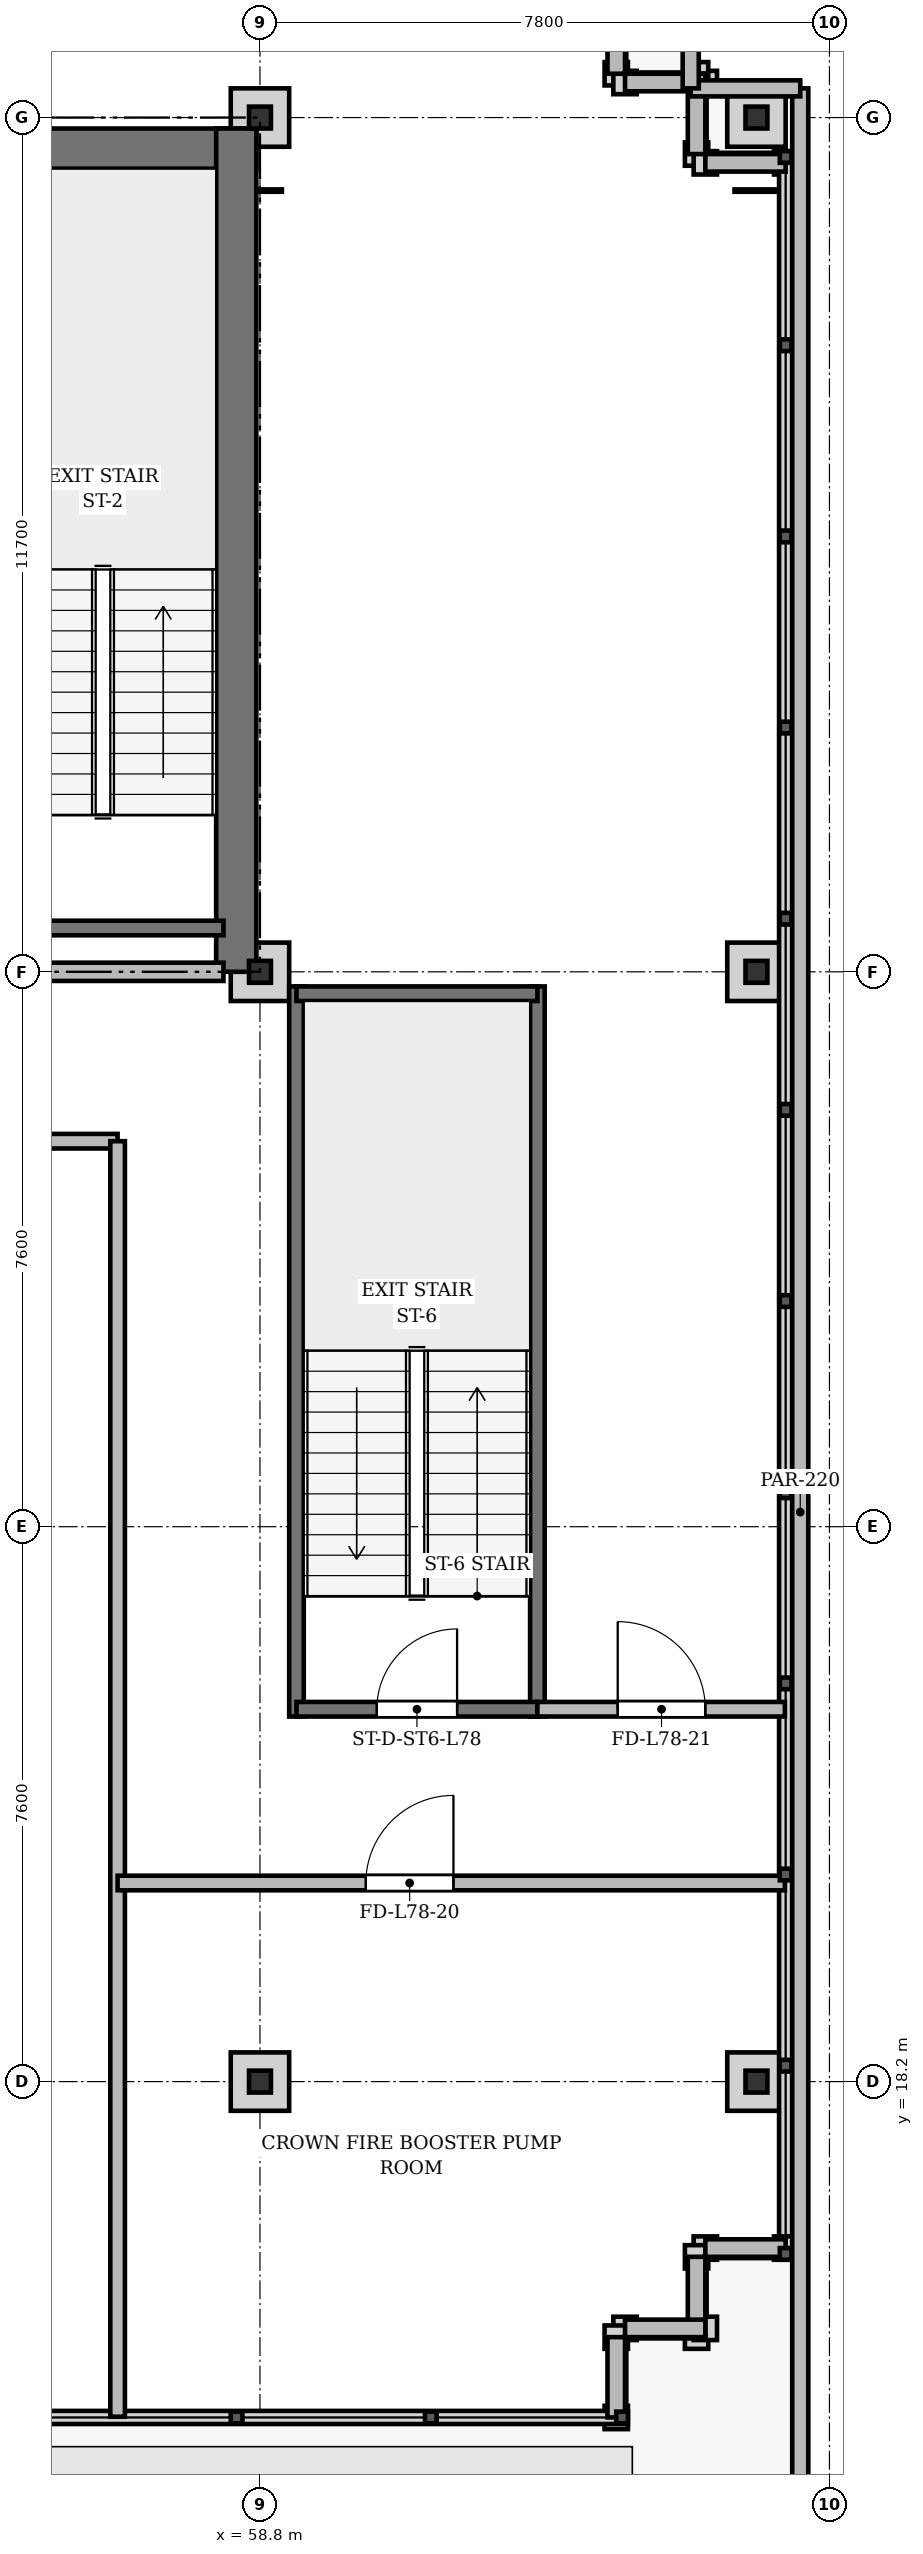
"""IFC4 building model, lengths in metres.
Left out: names, types, materials, properties, quantities, classifications, styles, units other than length and angle.
Written with IfcOpenShell. Run it as: python <this file> out.ifc"""

import sys

from ifc_helpers import new_model, si_unit, direction, frame, frame_2d, origin, origin_2d, place, context, subcontext, project, spatial, rectangle, i_section, extrude, source, transform, mapped, element, fill, save


model = new_model("IFC4")
c1 = context("Model", 3, precision=1e-05, world=origin(), true_north=direction((0.0, 1.0)))
c2 = subcontext(c1, "Body", "Model", "MODEL_VIEW")
j1 = project(units=[si_unit("LENGTHUNIT", "METRE"), si_unit("PLANEANGLEUNIT", "RADIAN")], contexts=[c1])
p1 = place(None, origin())
s1 = spatial("IfcSite", under=j1, at=p1, CompositionType="ELEMENT")
p2 = place(p1, origin())
s2 = spatial("IfcBuilding", under=s1, at=p2, CompositionType="ELEMENT")
p3 = place(p2, frame((0.0, 0.0, 299.1)))
s3 = spatial("IfcBuildingStorey", under=s2, at=p3, CompositionType="ELEMENT", Elevation=299.1)
m1 = source(origin(), c2, "Body", "SweptSolid", [
    extrude(i_section(OverallWidth=0.3, OverallDepth=0.3, WebThickness=0.015, FlangeThickness=0.024, at=origin_2d()), origin(), (0.0, 0.0, 1.0), 4.4),
])
for number, where, z_axis, x_axis in (
    (1, (58.8, 18.2, 0.0), (0.0, 0.0, 1.0), (1.0, 0.0, 0.0)),
    (2, (58.8, 33.4, 0.0), (0.0, 0.0, 1.0), (1.0, 0.0, 0.0)),
    (3, (58.8, 45.1, 0.0), (0.0, 0.0, 1.0), (1.0, 0.0, 0.0)),
    (4, (65.6, 18.2, 0.0), (0.0, 0.0, 1.0), (1.0, 0.0, 0.0)),
    (5, (65.6, 33.4, 0.0), (0.0, 0.0, 1.0), (1.0, 0.0, 0.0)),
    (6, (65.6, 45.1, 0.0), (0.0, 0.0, 1.0), (1.0, 0.0, 0.0)),
):
    element("IfcColumn", number, at=place(p3, frame(where, z_axis=z_axis, x_axis=x_axis)), inside=s3, PredefinedType="COLUMN", context=c2, shape_type="MappedRepresentation", body=[
        mapped(m1, transform((0.0, 0.0, 0.0), x_axis=(1.0, 0.0, 0.0), y_axis=(0.0, 1.0, 0.0), z_axis=(0.0, 0.0, 1.0), scale=1.0)),
    ])
p4 = place(p3, frame((63.68, 46.8, 0.0), z_axis=(0.0, 0.0, 1.0), x_axis=(0.0, -1.0, 0.0)))
e7 = element("IfcWall", 7, at=p4, inside=s3, PredefinedType="SOLIDWALL", context=c2, shape_type="SweptSolid", body=[
    extrude(rectangle(XDim=1.1, YDim=0.24, at=frame_2d((0.55, 0.0))), origin(), (0.0, 0.0, 1.0), 4.12),
])
p5 = place(p3, frame((63.8, 45.58, 0.0), z_axis=(0.0, 0.0, 1.0), x_axis=(1.0, 0.0, 0.0)))
e8 = element("IfcWall", 8, at=p5, inside=s3, PredefinedType="SOLIDWALL", context=c2, shape_type="SweptSolid", body=[
    extrude(rectangle(XDim=1.1, YDim=0.24, at=frame_2d((0.55, 0.0))), origin(), (0.0, 0.0, 1.0), 4.12),
])
p6 = place(p3, frame((64.78, 45.7, 0.0), z_axis=(0.0, 0.0, 1.0), x_axis=(0.0, -1.0, 0.0)))
e9 = element("IfcWall", 9, at=p6, inside=s3, PredefinedType="SOLIDWALL", context=c2, shape_type="SweptSolid", body=[
    extrude(rectangle(XDim=1.1, YDim=0.24, at=frame_2d((0.55, 0.0))), origin(), (0.0, 0.0, 1.0), 3.62),
])
p7 = place(p3, frame((64.9, 44.48, 0.0), z_axis=(0.0, 0.0, 1.0), x_axis=(1.0, 0.0, 0.0)))
e10 = element("IfcWall", 10, at=p7, inside=s3, PredefinedType="SOLIDWALL", context=c2, shape_type="SweptSolid", body=[
    extrude(rectangle(XDim=1.1, YDim=0.24, at=frame_2d((0.55, 0.0))), origin(), (0.0, 0.0, 1.0), 3.62),
])
for number, where, z_axis, x_axis in (
    (11, (66.0, 15.92, 0.0), (0.0, 0.0, 1.0), (-1.0, 0.0, 0.0)),
    (12, (64.78, 15.8, 0.0), (0.0, 0.0, 1.0), (0.0, -1.0, 0.0)),
):
    element("IfcWall", number, at=place(p3, frame(where, z_axis=z_axis, x_axis=x_axis)), inside=s3, PredefinedType="SOLIDWALL", context=c2, shape_type="SweptSolid", body=[
        extrude(rectangle(XDim=1.1, YDim=0.24, at=frame_2d((0.55, 0.0))), origin(), (0.0, 0.0, 1.0), 4.12),
    ])
for number, where, z_axis, x_axis in (
    (13, (64.9, 14.82, 0.0), (0.0, 0.0, 1.0), (-1.0, 0.0, 0.0)),
    (14, (63.68, 14.7, 0.0), (0.0, 0.0, 1.0), (0.0, -1.0, 0.0)),
):
    element("IfcWall", number, at=place(p3, frame(where, z_axis=z_axis, x_axis=x_axis)), inside=s3, PredefinedType="SOLIDWALL", context=c2, shape_type="SweptSolid", body=[
        extrude(rectangle(XDim=1.1, YDim=0.24, at=frame_2d((0.55, 0.0))), origin(), (0.0, 0.0, 1.0), 4.12),
    ])
p8 = place(p3, frame((66.2, 6.5, 0.0), z_axis=(0.0, 0.0, 1.0), x_axis=(0.0, 1.0, 0.0)))
e15 = element("IfcWall", 15, at=p8, inside=s3, PredefinedType="PARAPET", context=c2, shape_type="SweptSolid", body=[
    extrude(rectangle(XDim=39.0, YDim=0.22, at=frame_2d((19.5, 0.0))), origin(), (0.0, 0.0, 1.0), 1.08),
])
for number, where, z_axis, x_axis in (
    (16, (66.2, 45.5, 0.0), (0.0, 0.0, 1.0), (-1.0, 0.0, 0.0)),
    (17, (64.7, 45.5, 0.0), (0.0, 0.0, 1.0), (0.0, 1.0, 0.0)),
):
    element("IfcWall", number, at=place(p3, frame(where, z_axis=z_axis, x_axis=x_axis)), inside=s3, PredefinedType="PARAPET", context=c2, shape_type="SweptSolid", body=[
        extrude(rectangle(XDim=1.5, YDim=0.22, at=frame_2d((0.75, 0.0))), origin(), (0.0, 0.0, 1.0), 1.08),
    ])
p9 = place(p3, frame((15.65, 44.675, 0.0), z_axis=(0.0, 0.0, 1.0), x_axis=(1.0, 0.0, 0.0)))
e18 = element("IfcWall", 18, at=p9, inside=s3, PredefinedType="SHEAR", context=c2, shape_type="SweptSolid", body=[
    extrude(rectangle(XDim=43.1, YDim=0.55, at=frame_2d((21.55, 0.0))), origin(), (0.0, 0.0, 1.0), 4.12),
])
p10 = place(p3, frame((58.475, 33.4, 0.0), z_axis=(0.0, 0.0, 1.0), x_axis=(0.0, 1.0, 0.0)))
e19 = element("IfcWall", 19, at=p10, inside=s3, PredefinedType="SHEAR", context=c2, shape_type="SweptSolid", body=[
    extrude(rectangle(XDim=11.55, YDim=0.55, at=frame_2d((5.775, 0.0))), origin(), (0.0, 0.0, 1.0), 4.12),
])
p11 = place(p3, frame((54.9, 34.0, 0.0), z_axis=(0.0, 0.0, 1.0), x_axis=(1.0, 0.0, 0.0)))
e20 = element("IfcWall", 20, at=p11, inside=s3, PredefinedType="SHEAR", context=c2, shape_type="SweptSolid", body=[
    extrude(rectangle(XDim=3.4, YDim=0.2, at=frame_2d((1.7, 0.0))), origin(), (0.0, 0.0, 1.0), 4.12),
])
for number, where, z_axis, x_axis in (
    (21, (59.3, 23.2, 0.0), (0.0, 0.0, 1.0), (0.0, 1.0, 0.0)),
    (22, (62.6, 23.2, 0.0), (0.0, 0.0, 1.0), (0.0, 1.0, 0.0)),
):
    element("IfcWall", number, at=place(p3, frame(where, z_axis=z_axis, x_axis=x_axis)), inside=s3, PredefinedType="SHEAR", context=c2, shape_type="SweptSolid", body=[
        extrude(rectangle(XDim=10.0, YDim=0.2, at=frame_2d((5.0, 0.0))), origin(), (0.0, 0.0, 1.0), 4.12),
    ])
p12 = place(p3, frame((59.3, 33.1, 0.0), z_axis=(0.0, 0.0, 1.0), x_axis=(1.0, 0.0, 0.0)))
e23 = element("IfcWall", 23, at=p12, inside=s3, PredefinedType="SHEAR", context=c2, shape_type="SweptSolid", body=[
    extrude(rectangle(XDim=3.3, YDim=0.2, at=frame_2d((1.65, 0.0))), origin(), (0.0, 0.0, 1.0), 4.12),
])
p13 = place(p3, frame((59.3, 23.3, 0.0), z_axis=(0.0, 0.0, 1.0), x_axis=(1.0, 0.0, 0.0)))
e24 = element("IfcWall", 24, at=p13, inside=s3, PredefinedType="SHEAR", context=c2, shape_type="SweptSolid", body=[
    extrude(rectangle(XDim=3.3, YDim=0.2, at=frame_2d((1.65, 0.0))), origin(), (0.0, 0.0, 1.0), 4.12),
])
p14 = place(p13, frame((1.1, 0.0, 0.0)))
e25 = element("IfcOpeningElement", 25, at=p14, cuts=e24, PredefinedType="OPENING", context=c2, shape_type="SweptSolid", body=[
    extrude(rectangle(XDim=1.1, YDim=2.15, at=frame_2d((0.55, 1.075))), frame((0.0, 0.11, 0.0), z_axis=(0.0, -1.0, 0.0), x_axis=(1.0, 0.0, 0.0)), (0.0, 0.0, 1.0), 0.22),
])
p15 = place(p3, frame((47.15, 33.4, 0.0), z_axis=(0.0, 0.0, 1.0), x_axis=(1.0, 0.0, 0.0)))
e26 = element("IfcWall", 26, at=p15, inside=s3, PredefinedType="PARTITIONING", context=c2, shape_type="SweptSolid", body=[
    extrude(rectangle(XDim=11.15, YDim=0.25, at=frame_2d((5.575, 0.0))), origin(), (0.0, 0.0, 1.0), 3.62),
])
p16 = place(p15, frame((0.7, 0.0, 0.0)))
e27 = element("IfcOpeningElement", 27, at=p16, cuts=e26, PredefinedType="OPENING", context=c2, shape_type="SweptSolid", body=[
    extrude(rectangle(XDim=0.95, YDim=2.15, at=frame_2d((0.475, 1.075))), frame((0.0, 0.135, 0.0), z_axis=(0.0, -1.0, 0.0), x_axis=(1.0, 0.0, 0.0)), (0.0, 0.0, 1.0), 0.27),
])
p17 = place(p15, frame((6.0, 0.0, 0.0)))
e28 = element("IfcOpeningElement", 28, at=p17, cuts=e26, PredefinedType="OPENING", context=c2, shape_type="SweptSolid", body=[
    extrude(rectangle(XDim=1.2, YDim=2.15, at=frame_2d((0.6, 1.075))), frame((0.0, 0.135, 0.0), z_axis=(0.0, -1.0, 0.0), x_axis=(1.0, 0.0, 0.0)), (0.0, 0.0, 1.0), 0.27),
])
p18 = place(p3, frame((17.55, 31.08, 0.0), z_axis=(0.0, 0.0, 1.0), x_axis=(1.0, 0.0, 0.0)))
e29 = element("IfcWall", 29, at=p18, inside=s3, PredefinedType="PARTITIONING", context=c2, shape_type="SweptSolid", body=[
    extrude(rectangle(XDim=39.3, YDim=0.2, at=frame_2d((19.65, 0.0))), origin(), (0.0, 0.0, 1.0), 3.62),
])
p19 = place(p18, frame((9.5, 0.0, 0.0)))
e30 = element("IfcOpeningElement", 30, at=p19, cuts=e29, PredefinedType="OPENING", context=c2, shape_type="SweptSolid", body=[
    extrude(rectangle(XDim=1.2, YDim=2.15, at=frame_2d((0.6, 1.075))), frame((0.0, 0.11, 0.0), z_axis=(0.0, -1.0, 0.0), x_axis=(1.0, 0.0, 0.0)), (0.0, 0.0, 1.0), 0.22),
])
p20 = place(p18, frame((24.5, 0.0, 0.0)))
e31 = element("IfcOpeningElement", 31, at=p20, cuts=e29, PredefinedType="OPENING", context=c2, shape_type="SweptSolid", body=[
    extrude(rectangle(XDim=1.2, YDim=2.15, at=frame_2d((0.6, 1.075))), frame((0.0, 0.11, 0.0), z_axis=(0.0, -1.0, 0.0), x_axis=(1.0, 0.0, 0.0)), (0.0, 0.0, 1.0), 0.22),
])
p21 = place(p3, frame((56.85, 13.61, 0.0), z_axis=(0.0, 0.0, 1.0), x_axis=(0.0, 1.0, 0.0)))
e32 = element("IfcWall", 32, at=p21, inside=s3, PredefinedType="PARTITIONING", context=c2, shape_type="SweptSolid", body=[
    extrude(rectangle(XDim=17.47, YDim=0.2, at=frame_2d((8.735, 0.0))), origin(), (0.0, 0.0, 1.0), 3.62),
])
p22 = place(p3, frame((56.85, 20.92, 0.0), z_axis=(0.0, 0.0, 1.0), x_axis=(1.0, 0.0, 0.0)))
e33 = element("IfcWall", 33, at=p22, inside=s3, PredefinedType="PARTITIONING", context=c2, shape_type="SweptSolid", body=[
    extrude(rectangle(XDim=9.14, YDim=0.2, at=frame_2d((4.57, 0.0))), origin(), (0.0, 0.0, 1.0), 3.62),
])
p23 = place(p22, frame((3.4, 0.0, 0.0)))
e34 = element("IfcOpeningElement", 34, at=p23, cuts=e33, PredefinedType="OPENING", context=c2, shape_type="SweptSolid", body=[
    extrude(rectangle(XDim=1.2, YDim=2.15, at=frame_2d((0.6, 1.075))), frame((0.0, 0.11, 0.0), z_axis=(0.0, -1.0, 0.0), x_axis=(1.0, 0.0, 0.0)), (0.0, 0.0, 1.0), 0.22),
])
p24 = place(p3, frame((62.6, 23.3, 0.0), z_axis=(0.0, 0.0, 1.0), x_axis=(1.0, 0.0, 0.0)))
e35 = element("IfcWall", 35, at=p24, inside=s3, PredefinedType="PARTITIONING", context=c2, shape_type="SweptSolid", body=[
    extrude(rectangle(XDim=3.39, YDim=0.2, at=frame_2d((1.695, 0.0))), origin(), (0.0, 0.0, 1.0), 3.62),
])
p25 = place(p24, frame((1.1, 0.0, 0.0)))
e36 = element("IfcOpeningElement", 36, at=p25, cuts=e35, PredefinedType="OPENING", context=c2, shape_type="SweptSolid", body=[
    extrude(rectangle(XDim=1.2, YDim=2.15, at=frame_2d((0.6, 1.075))), frame((0.0, 0.11, 0.0), z_axis=(0.0, -1.0, 0.0), x_axis=(1.0, 0.0, 0.0)), (0.0, 0.0, 1.0), 0.22),
])
m2 = source(origin(), c2, "Body", "SweptSolid", [
    extrude(rectangle(XDim=1.1, YDim=2.15, at=frame_2d((0.55, 1.075))), frame((0.0, 0.025, 0.0), z_axis=(0.0, -1.0, 0.0), x_axis=(1.0, 0.0, 0.0)), (0.0, 0.0, 1.0), 0.05),
])
p26 = place(p14, origin())
e37 = element("IfcDoor", 37, at=p26, inside=s3, OperationType="SINGLE_SWING_RIGHT", PredefinedType="DOOR", context=c2, shape_type="MappedRepresentation", body=[
    mapped(m2, transform((0.0, 0.0, 0.0), x_axis=(1.0, 0.0, 0.0), y_axis=(0.0, 1.0, 0.0), z_axis=(0.0, 0.0, 1.0), scale=1.0)),
])
fill(e25, e37)
m3 = source(origin(), c2, "Body", "SweptSolid", [
    extrude(rectangle(XDim=1.2, YDim=2.15, at=frame_2d((0.6, 1.075))), frame((0.0, 0.025, 0.0), z_axis=(0.0, -1.0, 0.0), x_axis=(1.0, 0.0, 0.0)), (0.0, 0.0, 1.0), 0.05),
])
p27 = place(p23, origin())
e38 = element("IfcDoor", 38, at=p27, inside=s3, OperationType="SINGLE_SWING_RIGHT", PredefinedType="DOOR", context=c2, shape_type="MappedRepresentation", body=[
    mapped(m3, transform((0.0, 0.0, 0.0), x_axis=(1.0, 0.0, 0.0), y_axis=(0.0, 1.0, 0.0), z_axis=(0.0, 0.0, 1.0), scale=1.0)),
])
fill(e34, e38)
p28 = place(p25, origin())
e39 = element("IfcDoor", 39, at=p28, inside=s3, OperationType="SINGLE_SWING_LEFT", PredefinedType="DOOR", context=c2, shape_type="MappedRepresentation", body=[
    mapped(m3, transform((0.0, 0.0, 0.0), x_axis=(1.0, 0.0, 0.0), y_axis=(0.0, 1.0, 0.0), z_axis=(0.0, 0.0, 1.0), scale=1.0)),
])
fill(e36, e39)
save(model, sys.argv[1])
